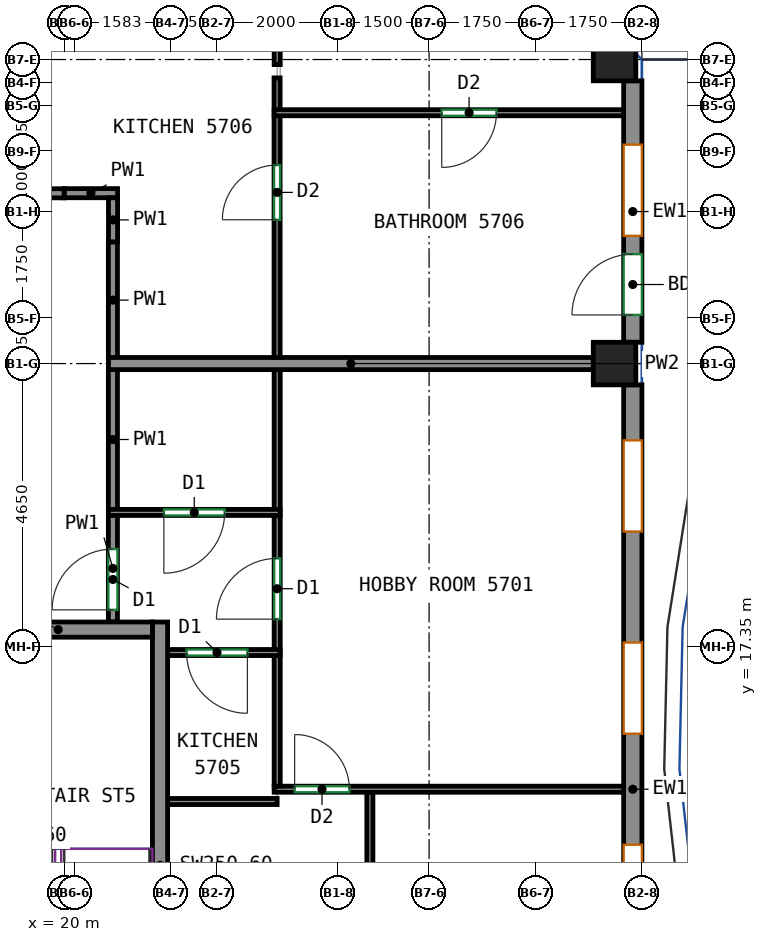
"""IFC4 building model, lengths in metres.
Left out: names, types, materials, properties, quantities, classifications, styles, units other than length and angle.
Written with IfcOpenShell. Run it as: python <this file> out.ifc"""

import sys

from ifc_helpers import new_model, si_unit, direction, frame, frame_2d, origin, origin_2d, place, context, subcontext, project, spatial, rectangle, extrude, source, transform, mapped, element, fill, save


model = new_model("IFC4")
c1 = context("Model", 3, precision=1e-05, world=origin(), true_north=direction((0.0, 1.0)))
c2 = subcontext(c1, "Body", "Model", "MODEL_VIEW")
j1 = project(units=[si_unit("LENGTHUNIT", "METRE"), si_unit("PLANEANGLEUNIT", "RADIAN")], contexts=[c1])
p1 = place(None, origin())
s1 = spatial("IfcSite", under=j1, at=p1, CompositionType="ELEMENT")
p2 = place(p1, origin())
s2 = spatial("IfcBuilding", under=s1, at=p2, CompositionType="ELEMENT")
p3 = place(p2, frame((0.0, 0.0, 239.0)))
s3 = spatial("IfcBuildingStorey", under=s2, at=p3, CompositionType="ELEMENT", Elevation=239.0)
m1 = source(origin(), c2, "Body", "SweptSolid", [
    extrude(rectangle(XDim=0.7, YDim=0.7, at=origin_2d()), origin(), (0.0, 0.0, 1.0), 3.12),
])
for number, where, z_axis, x_axis in (
    (1, (29.05, 22.0, 0.0), (0.0, 0.0, 1.0), (1.0, 0.0, 0.0)),
    (2, (29.05, 27.0, 0.0), (0.0, 0.0, 1.0), (1.0, 0.0, 0.0)),
):
    element("IfcColumn", number, at=place(p3, frame(where, z_axis=z_axis, x_axis=x_axis)), inside=s3, PredefinedType="COLUMN", context=c2, shape_type="MappedRepresentation", body=[
        mapped(m1, transform((0.0, 0.0, 0.0))),
    ])
m2 = source(origin(), c2, "Body", "SweptSolid", [
    extrude(rectangle(XDim=8.0, YDim=0.25, at=frame_2d((4.0, 0.0))), origin(), (0.0, 0.0, 1.0), 3.12),
])
p4 = place(p3, frame((21.575, 9.75, 0.0), z_axis=(0.0, 0.0, 1.0), x_axis=(0.0, 1.0, 0.0)))
e3 = element("IfcWall", 3, at=p4, inside=s3, PredefinedType="SHEAR", context=c2, shape_type="MappedRepresentation", body=[
    mapped(m2, transform((0.0, 0.0, 0.0))),
])
m3 = source(origin(), c2, "Body", "SweptSolid", [
    extrude(rectangle(XDim=3.1, YDim=0.25, at=frame_2d((1.55, 0.0))), origin(), (0.0, 0.0, 1.0), 3.12),
])
p5 = place(p3, frame((18.35, 17.625, 0.0), z_axis=(0.0, 0.0, 1.0), x_axis=(1.0, 0.0, 0.0)))
e4 = element("IfcWall", 4, at=p5, inside=s3, PredefinedType="SHEAR", context=c2, shape_type="MappedRepresentation", body=[
    mapped(m3, transform((0.0, 0.0, 0.0))),
])
m4 = source(origin(), c2, "Body", "SweptSolid", [
    extrude(rectangle(XDim=13.3, YDim=0.3, at=frame_2d((6.65, 0.0))), origin(), (0.0, 0.0, 1.0), 3.12),
])
p6 = place(p3, frame((29.35, 8.35, 0.0), z_axis=(0.0, 0.0, 1.0), x_axis=(0.0, 1.0, 0.0)))
e5 = element("IfcWall", 5, at=p6, inside=s3, PredefinedType="SOLIDWALL", context=c2, shape_type="MappedRepresentation", body=[
    mapped(m4, transform((0.0, 0.0, 0.0))),
])
p7 = place(p6, frame((0.913, 0.0, 0.8)))
e6 = element("IfcOpeningElement", 6, at=p7, cuts=e5, PredefinedType="OPENING", context=c2, shape_type="SweptSolid", body=[
    extrude(rectangle(XDim=1.5, YDim=2.05, at=frame_2d((0.75, 1.025))), frame((0.0, 0.16, 0.0), z_axis=(0.0, -1.0, 0.0), x_axis=(1.0, 0.0, 0.0)), (0.0, 0.0, 1.0), 0.32),
])
p8 = place(p6, frame((4.238, 0.0, 0.8)))
e7 = element("IfcOpeningElement", 7, at=p8, cuts=e5, PredefinedType="OPENING", context=c2, shape_type="SweptSolid", body=[
    extrude(rectangle(XDim=1.5, YDim=2.05, at=frame_2d((0.75, 1.025))), frame((0.0, 0.16, 0.0), z_axis=(0.0, -1.0, 0.0), x_axis=(1.0, 0.0, 0.0)), (0.0, 0.0, 1.0), 0.32),
])
p9 = place(p6, frame((7.562, 0.0, 0.8)))
e8 = element("IfcOpeningElement", 8, at=p9, cuts=e5, PredefinedType="OPENING", context=c2, shape_type="SweptSolid", body=[
    extrude(rectangle(XDim=1.5, YDim=2.05, at=frame_2d((0.75, 1.025))), frame((0.0, 0.16, 0.0), z_axis=(0.0, -1.0, 0.0), x_axis=(1.0, 0.0, 0.0)), (0.0, 0.0, 1.0), 0.32),
])
p10 = place(p6, frame((10.887, 0.0, 0.8)))
e9 = element("IfcOpeningElement", 9, at=p10, cuts=e5, PredefinedType="OPENING", context=c2, shape_type="SweptSolid", body=[
    extrude(rectangle(XDim=1.5, YDim=2.05, at=frame_2d((0.75, 1.025))), frame((0.0, 0.16, 0.0), z_axis=(0.0, -1.0, 0.0), x_axis=(1.0, 0.0, 0.0)), (0.0, 0.0, 1.0), 0.32),
])
m5 = source(origin(), c2, "Body", "SweptSolid", [
    extrude(rectangle(XDim=4.3, YDim=0.3, at=frame_2d((2.15, 0.0))), origin(), (0.0, 0.0, 1.0), 3.12),
])
p11 = place(p3, frame((29.35, 22.35, 0.0), z_axis=(0.0, 0.0, 1.0), x_axis=(0.0, 1.0, 0.0)))
e10 = element("IfcWall", 10, at=p11, inside=s3, PredefinedType="SOLIDWALL", context=c2, shape_type="MappedRepresentation", body=[
    mapped(m5, transform((0.0, 0.0, 0.0))),
])
p12 = place(p11, frame((1.75, 0.0, 0.8)))
e11 = element("IfcOpeningElement", 11, at=p12, cuts=e10, PredefinedType="OPENING", context=c2, shape_type="SweptSolid", body=[
    extrude(rectangle(XDim=1.5, YDim=2.05, at=frame_2d((0.75, 1.025))), frame((0.0, 0.16, 0.0), z_axis=(0.0, -1.0, 0.0), x_axis=(1.0, 0.0, 0.0)), (0.0, 0.0, 1.0), 0.32),
])
p13 = place(p11, frame((0.45, 0.0, 0.0)))
e12 = element("IfcOpeningElement", 12, at=p13, cuts=e10, PredefinedType="OPENING", context=c2, shape_type="SweptSolid", body=[
    extrude(rectangle(XDim=1.0, YDim=2.1, at=frame_2d((0.5, 1.05))), frame((0.0, 0.16, 0.0), z_axis=(0.0, -1.0, 0.0), x_axis=(1.0, 0.0, 0.0)), (0.0, 0.0, 1.0), 0.32),
])
p14 = place(p3, frame((20.8, 17.75, 0.0), z_axis=(0.0, 0.0, 1.0), x_axis=(0.0, 1.0, 0.0)))
e13 = element("IfcWall", 13, at=p14, inside=s3, PredefinedType="PARTITIONING", context=c2, shape_type="SweptSolid", body=[
    extrude(rectangle(XDim=1.762, YDim=0.15, at=frame_2d((0.881, 0.0))), origin(), (0.0, 0.0, 1.0), 3.12),
])
p15 = place(p14, frame((0.2, 0.0, 0.0)))
e14 = element("IfcOpeningElement", 14, at=p15, cuts=e13, PredefinedType="OPENING", context=c2, shape_type="SweptSolid", body=[
    extrude(rectangle(XDim=1.0, YDim=2.1, at=frame_2d((0.5, 1.05))), frame((0.0, 0.085, 0.0), z_axis=(0.0, -1.0, 0.0), x_axis=(1.0, 0.0, 0.0)), (0.0, 0.0, 1.0), 0.17),
])
p16 = place(p3, frame((20.8, 19.592, 0.0), z_axis=(0.0, 0.0, 1.0), x_axis=(0.0, 1.0, 0.0)))
e15 = element("IfcWall", 15, at=p16, inside=s3, PredefinedType="PARTITIONING", context=c2, shape_type="SweptSolid", body=[
    extrude(rectangle(XDim=2.318, YDim=0.15, at=frame_2d((1.159, 0.0))), origin(), (0.0, 0.0, 1.0), 3.12),
])
p17 = place(p3, frame((20.877, 24.802, 0.0), z_axis=(0.0, 0.0, 1.0), x_axis=(-1.0, 0.0, 0.0)))
e16 = element("IfcWall", 16, at=p17, inside=s3, PredefinedType="PARTITIONING", context=c2, shape_type="SweptSolid", body=[
    extrude(rectangle(XDim=0.879, YDim=0.15, at=frame_2d((0.439, 0.0))), origin(), (0.0, 0.0, 1.0), 3.12),
])
p18 = place(p3, frame((20.802, 23.998, 0.0), z_axis=(0.0, 0.0, 1.0), x_axis=(0.0, 1.0, 0.0)))
e17 = element("IfcWall", 17, at=p18, inside=s3, PredefinedType="PARTITIONING", context=c2, shape_type="SweptSolid", body=[
    extrude(rectangle(XDim=0.729, YDim=0.15, at=frame_2d((0.365, 0.0))), origin(), (0.0, 0.0, 1.0), 3.12),
])
p19 = place(p3, frame((20.8, 22.09, 0.0), z_axis=(0.0, 0.0, 1.0), x_axis=(0.0, 1.0, 0.0)))
e18 = element("IfcWall", 18, at=p19, inside=s3, PredefinedType="PARTITIONING", context=c2, shape_type="SweptSolid", body=[
    extrude(rectangle(XDim=1.908, YDim=0.15, at=frame_2d((0.954, 0.0))), origin(), (0.0, 0.0, 1.0), 3.12),
])
p20 = place(p3, frame((-16.075, 24.8, 0.0), z_axis=(0.0, 0.0, 1.0), x_axis=(1.0, 0.0, 0.0)))
e19 = element("IfcWall", 19, at=p20, inside=s3, PredefinedType="PARTITIONING", context=c2, shape_type="SweptSolid", body=[
    extrude(rectangle(XDim=36.073, YDim=0.15, at=frame_2d((18.037, 0.0))), origin(), (0.0, 0.0, 1.0), 3.12),
])
p21 = place(p20, frame((14.274, 0.0, 0.0)))
e20 = element("IfcOpeningElement", 20, at=p21, cuts=e19, PredefinedType="OPENING", context=c2, shape_type="SweptSolid", body=[
    extrude(rectangle(XDim=0.9, YDim=2.1, at=frame_2d((0.45, 1.05))), frame((0.0, 0.085, 0.0), z_axis=(0.0, -1.0, 0.0), x_axis=(1.0, 0.0, 0.0)), (0.0, 0.0, 1.0), 0.17),
])
p22 = place(p20, frame((28.875, 0.0, 0.0)))
e21 = element("IfcOpeningElement", 21, at=p22, cuts=e19, PredefinedType="OPENING", context=c2, shape_type="SweptSolid", body=[
    extrude(rectangle(XDim=1.0, YDim=2.1, at=frame_2d((0.5, 1.05))), frame((0.0, 0.085, 0.0), z_axis=(0.0, -1.0, 0.0), x_axis=(1.0, 0.0, 0.0)), (0.0, 0.0, 1.0), 0.17),
])
p23 = place(p3, frame((25.026, 8.1, 0.0), z_axis=(0.0, 0.0, 1.0), x_axis=(0.0, 1.0, 0.0)))
e22 = element("IfcWall", 22, at=p23, inside=s3, PredefinedType="PARTITIONING", context=c2, shape_type="SweptSolid", body=[
    extrude(rectangle(XDim=6.85, YDim=0.1, at=frame_2d((3.425, 0.0))), origin(), (0.0, 0.0, 1.0), 3.12),
])
p24 = place(p23, frame((1.613, 0.0, 0.0)))
e23 = element("IfcOpeningElement", 23, at=p24, cuts=e22, PredefinedType="OPENING", context=c2, shape_type="SweptSolid", body=[
    extrude(rectangle(XDim=0.9, YDim=2.1, at=frame_2d((0.45, 1.05))), frame((0.0, 0.06, 0.0), z_axis=(0.0, -1.0, 0.0), x_axis=(1.0, 0.0, 0.0)), (0.0, 0.0, 1.0), 0.12),
])
p25 = place(p3, frame((23.452, 15.0, 0.0), z_axis=(0.0, 0.0, 1.0), x_axis=(1.0, 0.0, 0.0)))
e24 = element("IfcWall", 24, at=p25, inside=s3, PredefinedType="PARTITIONING", context=c2, shape_type="SweptSolid", body=[
    extrude(rectangle(XDim=5.798, YDim=0.1, at=frame_2d((2.899, 0.0))), origin(), (0.0, 0.0, 1.0), 3.12),
])
p26 = place(p25, frame((0.337, 0.0, 0.0)))
e25 = element("IfcOpeningElement", 25, at=p26, cuts=e24, PredefinedType="OPENING", context=c2, shape_type="SweptSolid", body=[
    extrude(rectangle(XDim=0.9, YDim=2.1, at=frame_2d((0.45, 1.05))), frame((0.0, 0.06, 0.0), z_axis=(0.0, -1.0, 0.0), x_axis=(1.0, 0.0, 0.0)), (0.0, 0.0, 1.0), 0.12),
])
p27 = place(p3, frame((23.501, 14.798, 0.0), z_axis=(0.0, 0.0, 1.0), x_axis=(-1.0, 0.0, 0.0)))
e26 = element("IfcWall", 26, at=p27, inside=s3, PredefinedType="PARTITIONING", context=c2, shape_type="SweptSolid", body=[
    extrude(rectangle(XDim=1.801, YDim=0.1, at=frame_2d((0.9, 0.0))), origin(), (0.0, 0.0, 1.0), 3.12),
])
p28 = place(p3, frame((23.502, 15.05, 0.0), z_axis=(0.0, 0.0, 1.0), x_axis=(0.0, 1.0, 0.0)))
e27 = element("IfcWall", 27, at=p28, inside=s3, PredefinedType="PARTITIONING", context=c2, shape_type="SweptSolid", body=[
    extrude(rectangle(XDim=2.158, YDim=0.1, at=frame_2d((1.079, 0.0))), origin(), (0.0, 0.0, 1.0), 3.12),
])
p29 = place(p3, frame((23.502, 17.288, 0.0), z_axis=(0.0, 0.0, 1.0), x_axis=(0.0, 1.0, 0.0)))
e28 = element("IfcWall", 28, at=p29, inside=s3, PredefinedType="PARTITIONING", context=c2, shape_type="SweptSolid", body=[
    extrude(rectangle(XDim=2.224, YDim=0.1, at=frame_2d((1.112, 0.0))), origin(), (0.0, 0.0, 1.0), 3.12),
])
p30 = place(p29, frame((0.509, 0.0, 0.0)))
e29 = element("IfcOpeningElement", 29, at=p30, cuts=e28, PredefinedType="OPENING", context=c2, shape_type="SweptSolid", body=[
    extrude(rectangle(XDim=1.0, YDim=2.1, at=frame_2d((0.5, 1.05))), frame((0.0, 0.06, 0.0), z_axis=(0.0, -1.0, 0.0), x_axis=(1.0, 0.0, 0.0)), (0.0, 0.0, 1.0), 0.12),
])
p31 = place(p3, frame((23.502, 19.592, 0.0), z_axis=(0.0, 0.0, 1.0), x_axis=(0.0, 1.0, 0.0)))
e30 = element("IfcWall", 30, at=p31, inside=s3, PredefinedType="PARTITIONING", context=c2, shape_type="SweptSolid", body=[
    extrude(rectangle(XDim=2.308, YDim=0.1, at=frame_2d((1.154, 0.0))), origin(), (0.0, 0.0, 1.0), 3.12),
])
p32 = place(p3, frame((23.55, 17.248, 0.0), z_axis=(0.0, 0.0, 1.0), x_axis=(-1.0, 0.0, 0.0)))
e31 = element("IfcWall", 31, at=p32, inside=s3, PredefinedType="PARTITIONING", context=c2, shape_type="SweptSolid", body=[
    extrude(rectangle(XDim=1.85, YDim=0.1, at=frame_2d((0.925, 0.0))), origin(), (0.0, 0.0, 1.0), 3.12),
])
p33 = place(p32, frame((0.538, 0.0, 0.0)))
e32 = element("IfcOpeningElement", 32, at=p33, cuts=e31, PredefinedType="OPENING", context=c2, shape_type="SweptSolid", body=[
    extrude(rectangle(XDim=1.0, YDim=2.1, at=frame_2d((0.5, 1.05))), frame((0.0, 0.06, 0.0), z_axis=(0.0, -1.0, 0.0), x_axis=(1.0, 0.0, 0.0)), (0.0, 0.0, 1.0), 0.12),
])
p34 = place(p3, frame((23.55, 19.552, 0.0), z_axis=(0.0, 0.0, 1.0), x_axis=(-1.0, 0.0, 0.0)))
e33 = element("IfcWall", 33, at=p34, inside=s3, PredefinedType="PARTITIONING", context=c2, shape_type="SweptSolid", body=[
    extrude(rectangle(XDim=2.823, YDim=0.1, at=frame_2d((1.412, 0.0))), origin(), (0.0, 0.0, 1.0), 3.12),
])
p35 = place(p34, frame((0.912, 0.0, 0.0)))
e34 = element("IfcOpeningElement", 34, at=p35, cuts=e33, PredefinedType="OPENING", context=c2, shape_type="SweptSolid", body=[
    extrude(rectangle(XDim=1.0, YDim=2.1, at=frame_2d((0.5, 1.05))), frame((0.0, 0.06, 0.0), z_axis=(0.0, -1.0, 0.0), x_axis=(1.0, 0.0, 0.0)), (0.0, 0.0, 1.0), 0.12),
])
p36 = place(p3, frame((20.727, 22.0, 0.0), z_axis=(0.0, 0.0, 1.0), x_axis=(1.0, 0.0, 0.0)))
e35 = element("IfcWall", 35, at=p36, inside=s3, PredefinedType="PARTITIONING", context=c2, shape_type="SweptSolid", body=[
    extrude(rectangle(XDim=7.973, YDim=0.2, at=frame_2d((3.986, 0.0))), origin(), (0.0, 0.0, 1.0), 2.57),
])
p37 = place(p3, frame((23.5, 22.1, 0.0), z_axis=(0.0, 0.0, 1.0), x_axis=(0.0, 1.0, 0.0)))
e36 = element("IfcWall", 36, at=p37, inside=s3, PredefinedType="PARTITIONING", context=c2, shape_type="SweptSolid", body=[
    extrude(rectangle(XDim=3.985, YDim=0.1, at=frame_2d((1.992, 0.0))), origin(), (0.0, 0.0, 1.0), 3.12),
])
p38 = place(p37, frame((2.265, 0.0, 0.0)))
e37 = element("IfcOpeningElement", 37, at=p38, cuts=e36, PredefinedType="OPENING", context=c2, shape_type="SweptSolid", body=[
    extrude(rectangle(XDim=0.9, YDim=2.1, at=frame_2d((0.45, 1.05))), frame((0.0, 0.06, 0.0), z_axis=(0.0, -1.0, 0.0), x_axis=(1.0, 0.0, 0.0)), (0.0, 0.0, 1.0), 0.12),
])
p39 = place(p3, frame((23.502, 26.917, 0.0), z_axis=(0.0, 0.0, 1.0), x_axis=(0.0, 1.0, 0.0)))
e38 = element("IfcWall", 38, at=p39, inside=s3, PredefinedType="PARTITIONING", context=c2, shape_type="SweptSolid", body=[
    extrude(rectangle(XDim=0.535, YDim=0.1, at=frame_2d((0.268, 0.0))), origin(), (0.0, 0.0, 1.0), 3.12),
])
p40 = place(p3, frame((23.5, 26.165, 0.0), z_axis=(0.0, 0.0, 1.0), x_axis=(0.0, 1.0, 0.0)))
e39 = element("IfcWall", 39, at=p40, inside=s3, PredefinedType="PARTITIONING", context=c2, shape_type="SweptSolid", body=[
    extrude(rectangle(XDim=0.533, YDim=0.1, at=frame_2d((0.267, 0.0))), origin(), (0.0, 0.0, 1.0), 3.12),
])
p41 = place(p3, frame((29.25, 26.125, 0.0), z_axis=(0.0, 0.0, 1.0), x_axis=(-1.0, 0.0, 0.0)))
e40 = element("IfcWall", 40, at=p41, inside=s3, PredefinedType="PARTITIONING", context=c2, shape_type="SweptSolid", body=[
    extrude(rectangle(XDim=5.798, YDim=0.1, at=frame_2d((2.899, 0.0))), origin(), (0.0, 0.0, 1.0), 3.12),
])
p42 = place(p41, frame((2.142, 0.0, 0.0)))
e41 = element("IfcOpeningElement", 41, at=p42, cuts=e40, PredefinedType="OPENING", context=c2, shape_type="SweptSolid", body=[
    extrude(rectangle(XDim=0.9, YDim=2.1, at=frame_2d((0.45, 1.05))), frame((0.0, 0.06, 0.0), z_axis=(0.0, -1.0, 0.0), x_axis=(1.0, 0.0, 0.0)), (0.0, 0.0, 1.0), 0.12),
])
p43 = place(p8, origin())
e42 = element("IfcWindow", 42, at=p43, inside=s3, PartitioningType="SINGLE_PANEL", PredefinedType="WINDOW", context=c2, shape_type="SweptSolid", body=[
    extrude(rectangle(XDim=1.5, YDim=2.05, at=frame_2d((0.75, 1.025))), frame((0.0, 0.03, 0.0), z_axis=(0.0, -1.0, 0.0), x_axis=(1.0, 0.0, 0.0)), (0.0, 0.0, 1.0), 0.06),
])
fill(e7, e42)
p44 = place(p9, origin())
e43 = element("IfcWindow", 43, at=p44, inside=s3, PartitioningType="SINGLE_PANEL", PredefinedType="WINDOW", context=c2, shape_type="SweptSolid", body=[
    extrude(rectangle(XDim=1.5, YDim=2.05, at=frame_2d((0.75, 1.025))), frame((0.0, 0.03, 0.0), z_axis=(0.0, -1.0, 0.0), x_axis=(1.0, 0.0, 0.0)), (0.0, 0.0, 1.0), 0.06),
])
fill(e8, e43)
p45 = place(p10, origin())
e44 = element("IfcWindow", 44, at=p45, inside=s3, PartitioningType="SINGLE_PANEL", PredefinedType="WINDOW", context=c2, shape_type="SweptSolid", body=[
    extrude(rectangle(XDim=1.5, YDim=2.05, at=frame_2d((0.75, 1.025))), frame((0.0, 0.03, 0.0), z_axis=(0.0, -1.0, 0.0), x_axis=(1.0, 0.0, 0.0)), (0.0, 0.0, 1.0), 0.06),
])
fill(e9, e44)
p46 = place(p12, origin())
e45 = element("IfcWindow", 45, at=p46, inside=s3, PartitioningType="SINGLE_PANEL", PredefinedType="WINDOW", context=c2, shape_type="SweptSolid", body=[
    extrude(rectangle(XDim=1.5, YDim=2.05, at=frame_2d((0.75, 1.025))), frame((0.0, 0.03, 0.0), z_axis=(0.0, -1.0, 0.0), x_axis=(1.0, 0.0, 0.0)), (0.0, 0.0, 1.0), 0.06),
])
fill(e11, e45)
p47 = place(p13, origin())
e46 = element("IfcDoor", 46, at=p47, inside=s3, OperationType="SINGLE_SWING_LEFT", PredefinedType="DOOR", context=c2, shape_type="SweptSolid", body=[
    extrude(rectangle(XDim=1.0, YDim=2.1, at=frame_2d((0.5, 1.05))), frame((0.0, 0.025, 0.0), z_axis=(0.0, -1.0, 0.0), x_axis=(1.0, 0.0, 0.0)), (0.0, 0.0, 1.0), 0.05),
])
fill(e12, e46)
p48 = place(p26, origin())
e47 = element("IfcDoor", 47, at=p48, inside=s3, OperationType="SINGLE_SWING_LEFT", PredefinedType="DOOR", context=c2, shape_type="SweptSolid", body=[
    extrude(rectangle(XDim=0.9, YDim=2.1, at=frame_2d((0.45, 1.05))), frame((0.0, 0.025, 0.0), z_axis=(0.0, -1.0, 0.0), x_axis=(1.0, 0.0, 0.0)), (0.0, 0.0, 1.0), 0.05),
])
fill(e25, e47)
p49 = place(p33, origin())
e48 = element("IfcDoor", 48, at=p49, inside=s3, OperationType="SINGLE_SWING_LEFT", PredefinedType="DOOR", context=c2, shape_type="SweptSolid", body=[
    extrude(rectangle(XDim=1.0, YDim=2.1, at=frame_2d((0.5, 1.05))), frame((0.0, 0.025, 0.0), z_axis=(0.0, -1.0, 0.0), x_axis=(1.0, 0.0, 0.0)), (0.0, 0.0, 1.0), 0.05),
])
fill(e32, e48)
p50 = place(p30, origin())
e49 = element("IfcDoor", 49, at=p50, inside=s3, OperationType="SINGLE_SWING_LEFT", PredefinedType="DOOR", context=c2, shape_type="SweptSolid", body=[
    extrude(rectangle(XDim=1.0, YDim=2.1, at=frame_2d((0.5, 1.05))), frame((0.0, 0.025, 0.0), z_axis=(0.0, -1.0, 0.0), x_axis=(1.0, 0.0, 0.0)), (0.0, 0.0, 1.0), 0.05),
])
fill(e29, e49)
p51 = place(p15, origin())
e50 = element("IfcDoor", 50, at=p51, inside=s3, OperationType="SINGLE_SWING_LEFT", PredefinedType="DOOR", context=c2, shape_type="SweptSolid", body=[
    extrude(rectangle(XDim=1.0, YDim=2.1, at=frame_2d((0.5, 1.05))), frame((0.0, 0.025, 0.0), z_axis=(0.0, -1.0, 0.0), x_axis=(1.0, 0.0, 0.0)), (0.0, 0.0, 1.0), 0.05),
])
fill(e14, e50)
p52 = place(p35, origin())
e51 = element("IfcDoor", 51, at=p52, inside=s3, OperationType="SINGLE_SWING_RIGHT", PredefinedType="DOOR", context=c2, shape_type="SweptSolid", body=[
    extrude(rectangle(XDim=1.0, YDim=2.1, at=frame_2d((0.5, 1.05))), frame((0.0, 0.025, 0.0), z_axis=(0.0, -1.0, 0.0), x_axis=(1.0, 0.0, 0.0)), (0.0, 0.0, 1.0), 0.05),
])
fill(e34, e51)
p53 = place(p38, origin())
e52 = element("IfcDoor", 52, at=p53, inside=s3, OperationType="SINGLE_SWING_LEFT", PredefinedType="DOOR", context=c2, shape_type="SweptSolid", body=[
    extrude(rectangle(XDim=0.9, YDim=2.1, at=frame_2d((0.45, 1.05))), frame((0.0, 0.025, 0.0), z_axis=(0.0, -1.0, 0.0), x_axis=(1.0, 0.0, 0.0)), (0.0, 0.0, 1.0), 0.05),
])
fill(e37, e52)
p54 = place(p42, origin())
e53 = element("IfcDoor", 53, at=p54, inside=s3, OperationType="SINGLE_SWING_RIGHT", PredefinedType="DOOR", context=c2, shape_type="SweptSolid", body=[
    extrude(rectangle(XDim=0.9, YDim=2.1, at=frame_2d((0.45, 1.05))), frame((0.0, 0.025, 0.0), z_axis=(0.0, -1.0, 0.0), x_axis=(1.0, 0.0, 0.0)), (0.0, 0.0, 1.0), 0.05),
])
fill(e41, e53)
save(model, sys.argv[1])
